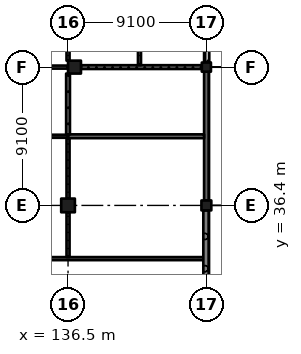
"""IFC4 building model, lengths in metres.
Left out: names, types, materials, properties, quantities, classifications, styles, units other than length and angle.
Written with IfcOpenShell. Run it as: python <this file> out.ifc"""

import sys

from ifc_helpers import new_model, si_unit, direction, frame, frame_2d, origin, origin_2d, place, context, subcontext, project, spatial, rectangle, extrude, element, fill, save


model = new_model("IFC4")
c1 = context("Model", 3, precision=1e-05, world=origin(), true_north=direction((0.0, 1.0)))
c2 = subcontext(c1, "Body", "Model", "MODEL_VIEW")
j1 = project(units=[si_unit("LENGTHUNIT", "METRE"), si_unit("PLANEANGLEUNIT", "RADIAN")], contexts=[c1])
p1 = place(None, origin())
s1 = spatial("IfcSite", under=j1, at=p1, CompositionType="ELEMENT")
p2 = place(p1, origin())
s2 = spatial("IfcBuilding", under=s1, at=p2, CompositionType="ELEMENT")
p3 = place(p2, origin())
s3 = spatial("IfcBuildingStorey", under=s2, at=p3, CompositionType="ELEMENT", Elevation=0.0)
p4 = place(p3, frame((136.5, 36.4, -0.4), z_axis=(0.0, 0.0, 1.0), x_axis=(1.0, 0.0, 0.0)))
e1 = element("IfcColumn", 1, at=p4, inside=s3, PredefinedType="COLUMN", context=c2, shape_type="SweptSolid", body=[
    extrude(rectangle(XDim=0.9, YDim=0.9, at=origin_2d()), origin(), (0.0, 0.0, 1.0), 6.77),
])
p5 = place(p3, frame((136.925, 45.5, -0.4), z_axis=(0.0, 0.0, 1.0), x_axis=(1.0, 0.0, 0.0)))
e2 = element("IfcColumn", 2, at=p5, inside=s3, PredefinedType="COLUMN", context=c2, shape_type="SweptSolid", body=[
    extrude(rectangle(XDim=0.85, YDim=0.85, at=origin_2d()), origin(), (0.0, 0.0, 1.0), 6.77),
])
p6 = place(p3, frame((145.6, 36.4, -0.4), z_axis=(0.0, 0.0, 1.0), x_axis=(1.0, 0.0, 0.0)))
e3 = element("IfcColumn", 3, at=p6, inside=s3, PredefinedType="COLUMN", context=c2, shape_type="SweptSolid", body=[
    extrude(rectangle(XDim=0.65, YDim=0.65, at=origin_2d()), origin(), (0.0, 0.0, 1.0), 6.77),
])
p7 = place(p3, frame((145.6, 45.5, -0.4), z_axis=(0.0, 0.0, 1.0), x_axis=(1.0, 0.0, 0.0)))
e4 = element("IfcColumn", 4, at=p7, inside=s3, PredefinedType="COLUMN", context=c2, shape_type="SweptSolid", body=[
    extrude(rectangle(XDim=0.6, YDim=0.6, at=origin_2d()), origin(), (0.0, 0.0, 1.0), 6.77),
])
p8 = place(p3, frame((145.575, 27.55, 0.0), z_axis=(0.0, 0.0, 1.0), x_axis=(0.0, 1.0, 0.0)))
e5 = element("IfcWall", 5, at=p8, inside=s3, PredefinedType="SOLIDWALL", context=c2, shape_type="SweptSolid", body=[
    extrude(rectangle(XDim=8.525, YDim=0.35, at=frame_2d((4.262, 0.0))), origin(), (0.0, 0.0, 1.0), 5.27),
])
p9 = place(p3, frame((145.6, 36.725, 0.0), z_axis=(0.0, 0.0, 1.0), x_axis=(0.0, 1.0, 0.0)))
e6 = element("IfcWall", 6, at=p9, inside=s3, PredefinedType="SOLIDWALL", context=c2, shape_type="SweptSolid", body=[
    extrude(rectangle(XDim=8.475, YDim=0.3, at=frame_2d((4.237, 0.0))), origin(), (0.0, 0.0, 1.0), 5.27),
])
p10 = place(p3, frame((145.6, 45.8, 0.0), z_axis=(0.0, 0.0, 1.0), x_axis=(0.0, 1.0, 0.0)))
e7 = element("IfcWall", 7, at=p10, inside=s3, PredefinedType="SOLIDWALL", context=c2, shape_type="SweptSolid", body=[
    extrude(rectangle(XDim=8.5, YDim=0.3, at=frame_2d((4.25, 0.0))), origin(), (0.0, 0.0, 1.0), 3.75),
])
p11 = place(p10, frame((0.435, 0.0, 0.0)))
e8 = element("IfcOpeningElement", 8, at=p11, cuts=e7, PredefinedType="OPENING", context=c2, shape_type="SweptSolid", body=[
    extrude(rectangle(XDim=3.6, YDim=2.7, at=frame_2d((1.8, 1.35))), frame((0.0, 0.16, 0.0), z_axis=(0.0, -1.0, 0.0), x_axis=(1.0, 0.0, 0.0)), (0.0, 0.0, 1.0), 0.32),
])
p12 = place(p10, frame((4.465, 0.0, 0.0)))
e9 = element("IfcOpeningElement", 9, at=p12, cuts=e7, PredefinedType="OPENING", context=c2, shape_type="SweptSolid", body=[
    extrude(rectangle(XDim=3.6, YDim=2.7, at=frame_2d((1.8, 1.35))), frame((0.0, 0.16, 0.0), z_axis=(0.0, -1.0, 0.0), x_axis=(1.0, 0.0, 0.0)), (0.0, 0.0, 1.0), 0.32),
])
p13 = place(p3, frame((127.3, 40.95, 0.0), z_axis=(0.0, 0.0, 1.0), x_axis=(1.0, 0.0, 0.0)))
e10 = element("IfcWall", 10, at=p13, inside=s3, PredefinedType="PARTITIONING", context=c2, shape_type="SweptSolid", body=[
    extrude(rectangle(XDim=9.2, YDim=0.2, at=frame_2d((4.6, 0.0))), origin(), (0.0, 0.0, 1.0), 6.02),
])
p14 = place(p13, frame((0.75, 0.0, 0.0)))
e11 = element("IfcOpeningElement", 11, at=p14, cuts=e10, PredefinedType="OPENING", context=c2, shape_type="SweptSolid", body=[
    extrude(rectangle(XDim=3.0, YDim=2.4, at=frame_2d((1.5, 1.2))), frame((0.0, 0.11, 0.0), z_axis=(0.0, -1.0, 0.0), x_axis=(1.0, 0.0, 0.0)), (0.0, 0.0, 1.0), 0.22),
])
p15 = place(p13, frame((5.35, 0.0, 0.0)))
e12 = element("IfcOpeningElement", 12, at=p15, cuts=e10, PredefinedType="OPENING", context=c2, shape_type="SweptSolid", body=[
    extrude(rectangle(XDim=3.0, YDim=2.4, at=frame_2d((1.5, 1.2))), frame((0.0, 0.11, 0.0), z_axis=(0.0, -1.0, 0.0), x_axis=(1.0, 0.0, 0.0)), (0.0, 0.0, 1.0), 0.22),
])
p16 = place(p3, frame((118.3, 32.9, 0.0), z_axis=(0.0, 0.0, 1.0), x_axis=(1.0, 0.0, 0.0)))
e13 = element("IfcWall", 13, at=p16, inside=s3, PredefinedType="PARTITIONING", context=c2, shape_type="SweptSolid", body=[
    extrude(rectangle(XDim=27.1, YDim=0.2, at=frame_2d((13.55, 0.0))), origin(), (0.0, 0.0, 1.0), 6.02),
])
p17 = place(p16, frame((22.15, 0.0, 0.0)))
e14 = element("IfcOpeningElement", 14, at=p17, cuts=e13, PredefinedType="OPENING", context=c2, shape_type="SweptSolid", body=[
    extrude(rectangle(XDim=1.1, YDim=2.1, at=frame_2d((0.55, 1.05))), frame((0.0, 0.11, 0.0), z_axis=(0.0, -1.0, 0.0), x_axis=(1.0, 0.0, 0.0)), (0.0, 0.0, 1.0), 0.22),
])
p18 = place(p16, frame((3.95, 0.0, 0.0)))
e15 = element("IfcOpeningElement", 15, at=p18, cuts=e13, PredefinedType="OPENING", context=c2, shape_type="SweptSolid", body=[
    extrude(rectangle(XDim=1.1, YDim=2.1, at=frame_2d((0.55, 1.05))), frame((0.0, 0.11, 0.0), z_axis=(0.0, -1.0, 0.0), x_axis=(1.0, 0.0, 0.0)), (0.0, 0.0, 1.0), 0.22),
])
p19 = place(p16, frame((10.15, 0.0, 0.0)))
e16 = element("IfcOpeningElement", 16, at=p19, cuts=e13, PredefinedType="OPENING", context=c2, shape_type="SweptSolid", body=[
    extrude(rectangle(XDim=2.4, YDim=2.4, at=frame_2d((1.2, 1.2))), frame((0.0, 0.11, 0.0), z_axis=(0.0, -1.0, 0.0), x_axis=(1.0, 0.0, 0.0)), (0.0, 0.0, 1.0), 0.22),
])
p20 = place(p16, frame((14.75, 0.0, 0.0)))
e17 = element("IfcOpeningElement", 17, at=p20, cuts=e13, PredefinedType="OPENING", context=c2, shape_type="SweptSolid", body=[
    extrude(rectangle(XDim=2.4, YDim=2.4, at=frame_2d((1.2, 1.2))), frame((0.0, 0.11, 0.0), z_axis=(0.0, -1.0, 0.0), x_axis=(1.0, 0.0, 0.0)), (0.0, 0.0, 1.0), 0.22),
])
p21 = place(p3, frame((136.5, 33.0, 0.0), z_axis=(0.0, 0.0, 1.0), x_axis=(0.0, 1.0, 0.0)))
e18 = element("IfcWall", 18, at=p21, inside=s3, PredefinedType="PARTITIONING", context=c2, shape_type="SweptSolid", body=[
    extrude(rectangle(XDim=2.95, YDim=0.2, at=frame_2d((1.475, 0.0))), origin(), (0.0, 0.0, 1.0), 5.32),
])
p22 = place(p3, frame((136.5, 36.85, 0.0), z_axis=(0.0, 0.0, 1.0), x_axis=(0.0, 1.0, 0.0)))
e19 = element("IfcWall", 19, at=p22, inside=s3, PredefinedType="PARTITIONING", context=c2, shape_type="SweptSolid", body=[
    extrude(rectangle(XDim=3.975, YDim=0.2, at=frame_2d((1.987, 0.0))), origin(), (0.0, 0.0, 1.0), 5.32),
])
p23 = place(p3, frame((136.5, 40.95, 0.0), z_axis=(0.0, 0.0, 1.0), x_axis=(1.0, 0.0, 0.0)))
e20 = element("IfcWall", 20, at=p23, inside=s3, PredefinedType="SOLIDWALL", context=c2, shape_type="SweptSolid", body=[
    extrude(rectangle(XDim=8.95, YDim=0.25, at=frame_2d((4.475, 0.0))), origin(), (0.0, 0.0, 1.0), 6.02),
])
p24 = place(p3, frame((136.5, 45.075, 0.0), z_axis=(0.0, 0.0, 1.0), x_axis=(0.0, -1.0, 0.0)))
e21 = element("IfcWall", 21, at=p24, inside=s3, PredefinedType="SOLIDWALL", context=c2, shape_type="SweptSolid", body=[
    extrude(rectangle(XDim=4.0, YDim=0.25, at=frame_2d((2.0, 0.0))), origin(), (0.0, 0.0, 1.0), 5.32),
])
p25 = place(p24, frame((1.55, 0.0, 0.0)))
e22 = element("IfcOpeningElement", 22, at=p25, cuts=e21, PredefinedType="OPENING", context=c2, shape_type="SweptSolid", body=[
    extrude(rectangle(XDim=0.8, YDim=2.1, at=frame_2d((0.4, 1.05))), frame((0.0, 0.135, 0.0), z_axis=(0.0, -1.0, 0.0), x_axis=(1.0, 0.0, 0.0)), (0.0, 0.0, 1.0), 0.27),
])
p26 = place(p3, frame((136.5, 45.5, 0.0), z_axis=(0.0, 0.0, 1.0), x_axis=(-1.0, 0.0, 0.0)))
e23 = element("IfcWall", 23, at=p26, inside=s3, PredefinedType="PARTITIONING", context=c2, shape_type="SweptSolid", body=[
    extrude(rectangle(XDim=8.5, YDim=0.2, at=frame_2d((4.25, 0.0))), origin(), (0.0, 0.0, 1.0), 5.27),
])
p27 = place(p26, frame((0.65, 0.0, 0.0)))
e24 = element("IfcOpeningElement", 24, at=p27, cuts=e23, PredefinedType="OPENING", context=c2, shape_type="SweptSolid", body=[
    extrude(rectangle(XDim=3.0, YDim=2.4, at=frame_2d((1.5, 1.2))), frame((0.0, 0.11, 0.0), z_axis=(0.0, -1.0, 0.0), x_axis=(1.0, 0.0, 0.0)), (0.0, 0.0, 1.0), 0.22),
])
p28 = place(p26, frame((4.85, 0.0, 0.0)))
e25 = element("IfcOpeningElement", 25, at=p28, cuts=e23, PredefinedType="OPENING", context=c2, shape_type="SweptSolid", body=[
    extrude(rectangle(XDim=3.0, YDim=2.4, at=frame_2d((1.5, 1.2))), frame((0.0, 0.11, 0.0), z_axis=(0.0, -1.0, 0.0), x_axis=(1.0, 0.0, 0.0)), (0.0, 0.0, 1.0), 0.22),
])
p29 = place(p3, frame((136.5, 54.175, 0.0), z_axis=(0.0, 0.0, 1.0), x_axis=(0.0, -1.0, 0.0)))
e26 = element("IfcWall", 26, at=p29, inside=s3, PredefinedType="PARTITIONING", context=c2, shape_type="SweptSolid", body=[
    extrude(rectangle(XDim=8.25, YDim=0.2, at=frame_2d((4.125, 0.0))), origin(), (0.0, 0.0, 1.0), 5.32),
])
p30 = place(p29, frame((1.15, 0.0, 0.0)))
e27 = element("IfcOpeningElement", 27, at=p30, cuts=e26, PredefinedType="OPENING", context=c2, shape_type="SweptSolid", body=[
    extrude(rectangle(XDim=1.8, YDim=2.4, at=frame_2d((0.9, 1.2))), frame((0.0, 0.11, 0.0), z_axis=(0.0, -1.0, 0.0), x_axis=(1.0, 0.0, 0.0)), (0.0, 0.0, 1.0), 0.22),
])
p31 = place(p29, frame((5.25, 0.0, 0.0)))
e28 = element("IfcOpeningElement", 28, at=p31, cuts=e26, PredefinedType="OPENING", context=c2, shape_type="SweptSolid", body=[
    extrude(rectangle(XDim=1.8, YDim=2.4, at=frame_2d((0.9, 1.2))), frame((0.0, 0.11, 0.0), z_axis=(0.0, -1.0, 0.0), x_axis=(1.0, 0.0, 0.0)), (0.0, 0.0, 1.0), 0.22),
])
p32 = place(p29, frame((3.45, 0.0, 0.0)))
e29 = element("IfcOpeningElement", 29, at=p32, cuts=e26, PredefinedType="OPENING", context=c2, shape_type="SweptSolid", body=[
    extrude(rectangle(XDim=1.8, YDim=2.4, at=frame_2d((0.9, 1.2))), frame((0.0, 0.11, 0.0), z_axis=(0.0, -1.0, 0.0), x_axis=(1.0, 0.0, 0.0)), (0.0, 0.0, 1.0), 0.22),
])
p33 = place(p3, frame((137.35, 45.5, 0.0), z_axis=(0.0, 0.0, 1.0), x_axis=(1.0, 0.0, 0.0)))
e30 = element("IfcWall", 30, at=p33, inside=s3, PredefinedType="SOLIDWALL", context=c2, shape_type="SweptSolid", body=[
    extrude(rectangle(XDim=7.95, YDim=0.25, at=frame_2d((3.975, 0.0))), origin(), (0.0, 0.0, 1.0), 5.32),
])
p34 = place(p3, frame((141.2, 63.637, 0.0), z_axis=(0.0, 0.0, 1.0), x_axis=(0.0, -1.0, 0.0)))
e31 = element("IfcWall", 31, at=p34, inside=s3, PredefinedType="PARTITIONING", context=c2, shape_type="SweptSolid", body=[
    extrude(rectangle(XDim=18.012, YDim=0.2, at=frame_2d((9.006, 0.0))), origin(), (0.0, 0.0, 1.0), 6.02),
])
p35 = place(p34, frame((0.65, 0.0, 0.0)))
e32 = element("IfcOpeningElement", 32, at=p35, cuts=e31, PredefinedType="OPENING", context=c2, shape_type="SweptSolid", body=[
    extrude(rectangle(XDim=1.8, YDim=2.4, at=frame_2d((0.9, 1.2))), frame((0.0, 0.11, 0.0), z_axis=(0.0, -1.0, 0.0), x_axis=(1.0, 0.0, 0.0)), (0.0, 0.0, 1.0), 0.22),
])
p36 = place(p34, frame((3.65, 0.0, 0.0)))
e33 = element("IfcOpeningElement", 33, at=p36, cuts=e31, PredefinedType="OPENING", context=c2, shape_type="SweptSolid", body=[
    extrude(rectangle(XDim=1.8, YDim=2.4, at=frame_2d((0.9, 1.2))), frame((0.0, 0.11, 0.0), z_axis=(0.0, -1.0, 0.0), x_axis=(1.0, 0.0, 0.0)), (0.0, 0.0, 1.0), 0.22),
])
p37 = place(p34, frame((6.65, 0.0, 0.0)))
e34 = element("IfcOpeningElement", 34, at=p37, cuts=e31, PredefinedType="OPENING", context=c2, shape_type="SweptSolid", body=[
    extrude(rectangle(XDim=1.8, YDim=2.4, at=frame_2d((0.9, 1.2))), frame((0.0, 0.11, 0.0), z_axis=(0.0, -1.0, 0.0), x_axis=(1.0, 0.0, 0.0)), (0.0, 0.0, 1.0), 0.22),
])
p38 = place(p34, frame((9.65, 0.0, 0.0)))
e35 = element("IfcOpeningElement", 35, at=p38, cuts=e31, PredefinedType="OPENING", context=c2, shape_type="SweptSolid", body=[
    extrude(rectangle(XDim=1.8, YDim=2.4, at=frame_2d((0.9, 1.2))), frame((0.0, 0.11, 0.0), z_axis=(0.0, -1.0, 0.0), x_axis=(1.0, 0.0, 0.0)), (0.0, 0.0, 1.0), 0.22),
])
p39 = place(p34, frame((12.65, 0.0, 0.0)))
e36 = element("IfcOpeningElement", 36, at=p39, cuts=e31, PredefinedType="OPENING", context=c2, shape_type="SweptSolid", body=[
    extrude(rectangle(XDim=1.8, YDim=2.4, at=frame_2d((0.9, 1.2))), frame((0.0, 0.11, 0.0), z_axis=(0.0, -1.0, 0.0), x_axis=(1.0, 0.0, 0.0)), (0.0, 0.0, 1.0), 0.22),
])
p40 = place(p34, frame((15.65, 0.0, 0.0)))
e37 = element("IfcOpeningElement", 37, at=p40, cuts=e31, PredefinedType="OPENING", context=c2, shape_type="SweptSolid", body=[
    extrude(rectangle(XDim=1.8, YDim=2.4, at=frame_2d((0.9, 1.2))), frame((0.0, 0.11, 0.0), z_axis=(0.0, -1.0, 0.0), x_axis=(1.0, 0.0, 0.0)), (0.0, 0.0, 1.0), 0.22),
])
p41 = place(p11, frame((3.6, 0.0, 0.0), z_axis=(0.0, 0.0, 1.0), x_axis=(-1.0, 0.0, 0.0)))
e38 = element("IfcDoor", 38, at=p41, inside=s3, OperationType="DOUBLE_DOOR_SINGLE_SWING", PredefinedType="DOOR", context=c2, shape_type="SweptSolid", body=[
    extrude(rectangle(XDim=3.6, YDim=2.7, at=frame_2d((1.8, 1.35))), frame((0.0, 0.025, 0.0), z_axis=(0.0, -1.0, 0.0), x_axis=(1.0, 0.0, 0.0)), (0.0, 0.0, 1.0), 0.05),
])
fill(e8, e38)
p42 = place(p17, origin())
e39 = element("IfcDoor", 39, at=p42, inside=s3, OperationType="SINGLE_SWING_LEFT", PredefinedType="DOOR", context=c2, shape_type="SweptSolid", body=[
    extrude(rectangle(XDim=1.1, YDim=2.1, at=frame_2d((0.55, 1.05))), frame((0.0, 0.025, 0.0), z_axis=(0.0, -1.0, 0.0), x_axis=(1.0, 0.0, 0.0)), (0.0, 0.0, 1.0), 0.05),
])
fill(e14, e39)
p43 = place(p25, origin())
e40 = element("IfcDoor", 40, at=p43, inside=s3, OperationType="SINGLE_SWING_RIGHT", PredefinedType="DOOR", context=c2, shape_type="SweptSolid", body=[
    extrude(rectangle(XDim=0.8, YDim=2.1, at=frame_2d((0.4, 1.05))), frame((0.0, 0.025, 0.0), z_axis=(0.0, -1.0, 0.0), x_axis=(1.0, 0.0, 0.0)), (0.0, 0.0, 1.0), 0.05),
])
fill(e22, e40)
p44 = place(p15, origin())
e41 = element("IfcDoor", 41, at=p44, inside=s3, OperationType="DOUBLE_DOOR_SINGLE_SWING", PredefinedType="DOOR", context=c2, shape_type="SweptSolid", body=[
    extrude(rectangle(XDim=3.0, YDim=2.4, at=frame_2d((1.5, 1.2))), frame((0.0, 0.025, 0.0), z_axis=(0.0, -1.0, 0.0), x_axis=(1.0, 0.0, 0.0)), (0.0, 0.0, 1.0), 0.05),
])
fill(e12, e41)
p45 = place(p27, origin())
e42 = element("IfcDoor", 42, at=p45, inside=s3, OperationType="DOUBLE_DOOR_SINGLE_SWING", PredefinedType="DOOR", context=c2, shape_type="SweptSolid", body=[
    extrude(rectangle(XDim=3.0, YDim=2.4, at=frame_2d((1.5, 1.2))), frame((0.0, 0.025, 0.0), z_axis=(0.0, -1.0, 0.0), x_axis=(1.0, 0.0, 0.0)), (0.0, 0.0, 1.0), 0.05),
])
fill(e24, e42)
p46 = place(p40, origin())
e43 = element("IfcDoor", 43, at=p46, inside=s3, OperationType="DOUBLE_DOOR_SINGLE_SWING", PredefinedType="DOOR", context=c2, shape_type="SweptSolid", body=[
    extrude(rectangle(XDim=1.8, YDim=2.4, at=frame_2d((0.9, 1.2))), frame((0.0, 0.025, 0.0), z_axis=(0.0, -1.0, 0.0), x_axis=(1.0, 0.0, 0.0)), (0.0, 0.0, 1.0), 0.05),
])
fill(e37, e43)
save(model, sys.argv[1])
